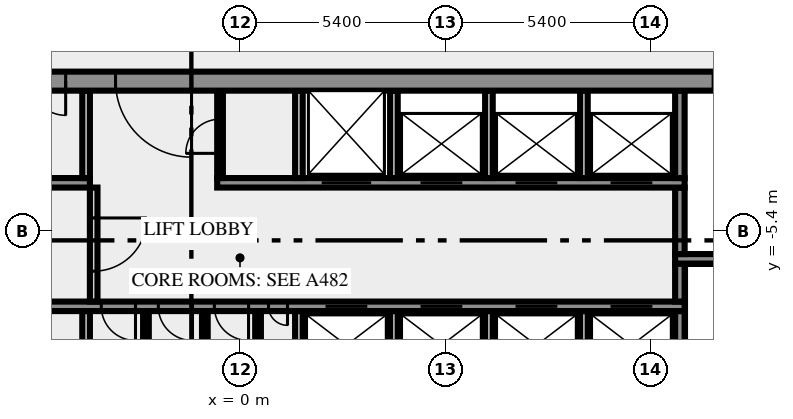
"""IFC4 building model, lengths in metres.
Left out: names, types, materials, properties, quantities, classifications, styles, units other than length and angle.
Written with IfcOpenShell. Run it as: python <this file> out.ifc"""

import sys

from ifc_helpers import new_model, si_unit, direction, frame, frame_2d, origin, place, context, subcontext, project, spatial, rectangle, extrude, element, fill, save


model = new_model("IFC4")
c1 = context("Model", 3, precision=1e-05, world=origin(), true_north=direction((0.0, 1.0)))
c2 = subcontext(c1, "Body", "Model", "MODEL_VIEW")
j1 = project(units=[si_unit("LENGTHUNIT", "METRE"), si_unit("PLANEANGLEUNIT", "RADIAN")], contexts=[c1])
p1 = place(None, origin())
s1 = spatial("IfcSite", under=j1, at=p1, CompositionType="ELEMENT")
p2 = place(p1, origin())
s2 = spatial("IfcBuilding", under=s1, at=p2, CompositionType="ELEMENT")
p3 = place(p2, frame((0.0, 0.0, 160.0)))
s3 = spatial("IfcBuildingStorey", under=s2, at=p3, CompositionType="ELEMENT", Elevation=160.0)
p4 = place(p3, frame((-4.05, -10.5, 0.0), z_axis=(0.0, 0.0, 1.0), x_axis=(0.0, 1.0, 0.0)))
e1 = element("IfcWall", 1, at=p4, inside=s3, PredefinedType="SOLIDWALL", context=c2, shape_type="SweptSolid", body=[
    extrude(rectangle(XDim=3.0, YDim=0.2, at=frame_2d((1.5, 0.0))), origin(), (0.0, 0.0, 1.0), 3.65),
])
for number, where, z_axis, x_axis in (
    (2, (-2.475, -10.5, 0.0), (0.0, 0.0, 1.0), (0.0, 1.0, 0.0)),
    (3, (-0.925, -10.5, 0.0), (0.0, 0.0, 1.0), (0.0, 1.0, 0.0)),
    (4, (0.475, -10.5, 0.0), (0.0, 0.0, 1.0), (0.0, 1.0, 0.0)),
):
    element("IfcWall", number, at=place(p3, frame(where, z_axis=z_axis, x_axis=x_axis)), inside=s3, PredefinedType="PARTITIONING", context=c2, shape_type="SweptSolid", body=[
        extrude(rectangle(XDim=3.0, YDim=0.15, at=frame_2d((1.5, 0.0))), origin(), (0.0, 0.0, 1.0), 3.65),
    ])
for number, where, z_axis, x_axis in (
    (5, (1.55, -10.5, 0.0), (0.0, 0.0, 1.0), (0.0, 1.0, 0.0)),
    (6, (4.05, -10.5, 0.0), (0.0, 0.0, 1.0), (0.0, 1.0, 0.0)),
    (7, (6.55, -10.5, 0.0), (0.0, 0.0, 1.0), (0.0, 1.0, 0.0)),
    (8, (9.05, -10.5, 0.0), (0.0, 0.0, 1.0), (0.0, 1.0, 0.0)),
):
    element("IfcWall", number, at=place(p3, frame(where, z_axis=z_axis, x_axis=x_axis)), inside=s3, PredefinedType="SOLIDWALL", context=c2, shape_type="SweptSolid", body=[
        extrude(rectangle(XDim=3.0, YDim=0.2, at=frame_2d((1.5, 0.0))), origin(), (0.0, 0.0, 1.0), 3.65),
    ])
p5 = place(p3, frame((11.575, -10.5, 0.0), z_axis=(0.0, 0.0, 1.0), x_axis=(0.0, 1.0, 0.0)))
e9 = element("IfcWall", 9, at=p5, inside=s3, PredefinedType="SHEAR", context=c2, shape_type="SweptSolid", body=[
    extrude(rectangle(XDim=3.0, YDim=0.25, at=frame_2d((1.5, 0.0))), origin(), (0.0, 0.0, 1.0), 3.65),
])
p6 = place(p3, frame((11.7, -7.375, 0.0), z_axis=(0.0, 0.0, 1.0), x_axis=(-1.0, 0.0, 0.0)))
e10 = element("IfcWall", 10, at=p6, inside=s3, PredefinedType="SHEAR", context=c2, shape_type="SweptSolid", body=[
    extrude(rectangle(XDim=23.4, YDim=0.25, at=frame_2d((11.7, 0.0))), origin(), (0.0, 0.0, 1.0), 3.65),
])
p7 = place(p6, frame((22.012, 0.0, 0.0)))
e11 = element("IfcOpeningElement", 11, at=p7, cuts=e10, PredefinedType="OPENING", context=c2, shape_type="SweptSolid", body=[
    extrude(rectangle(XDim=0.9, YDim=2.1, at=frame_2d((0.45, 1.05))), frame((0.0, 0.135, 0.0), z_axis=(0.0, -1.0, 0.0), x_axis=(1.0, 0.0, 0.0)), (0.0, 0.0, 1.0), 0.27),
])
p8 = place(p6, frame((20.05, 0.0, 0.0)))
e12 = element("IfcOpeningElement", 12, at=p8, cuts=e10, PredefinedType="OPENING", context=c2, shape_type="SweptSolid", body=[
    extrude(rectangle(XDim=0.9, YDim=2.1, at=frame_2d((0.45, 1.05))), frame((0.0, 0.135, 0.0), z_axis=(0.0, -1.0, 0.0), x_axis=(1.0, 0.0, 0.0)), (0.0, 0.0, 1.0), 0.27),
])
p9 = place(p6, frame((17.088, 0.0, 0.0)))
e13 = element("IfcOpeningElement", 13, at=p9, cuts=e10, PredefinedType="OPENING", context=c2, shape_type="SweptSolid", body=[
    extrude(rectangle(XDim=0.9, YDim=2.1, at=frame_2d((0.45, 1.05))), frame((0.0, 0.135, 0.0), z_axis=(0.0, -1.0, 0.0), x_axis=(1.0, 0.0, 0.0)), (0.0, 0.0, 1.0), 0.27),
])
p10 = place(p6, frame((14.45, 0.0, 0.0)))
e14 = element("IfcOpeningElement", 14, at=p10, cuts=e10, PredefinedType="OPENING", context=c2, shape_type="SweptSolid", body=[
    extrude(rectangle(XDim=0.9, YDim=2.1, at=frame_2d((0.45, 1.05))), frame((0.0, 0.135, 0.0), z_axis=(0.0, -1.0, 0.0), x_axis=(1.0, 0.0, 0.0)), (0.0, 0.0, 1.0), 0.27),
])
p11 = place(p6, frame((12.95, 0.0, 0.0)))
e15 = element("IfcOpeningElement", 15, at=p11, cuts=e10, PredefinedType="OPENING", context=c2, shape_type="SweptSolid", body=[
    extrude(rectangle(XDim=0.9, YDim=2.1, at=frame_2d((0.45, 1.05))), frame((0.0, 0.135, 0.0), z_axis=(0.0, -1.0, 0.0), x_axis=(1.0, 0.0, 0.0)), (0.0, 0.0, 1.0), 0.27),
])
p12 = place(p6, frame((11.475, 0.0, 0.0)))
e16 = element("IfcOpeningElement", 16, at=p12, cuts=e10, PredefinedType="OPENING", context=c2, shape_type="SweptSolid", body=[
    extrude(rectangle(XDim=0.9, YDim=2.1, at=frame_2d((0.45, 1.05))), frame((0.0, 0.135, 0.0), z_axis=(0.0, -1.0, 0.0), x_axis=(1.0, 0.0, 0.0)), (0.0, 0.0, 1.0), 0.27),
])
p13 = place(p6, frame((10.45, 0.0, 0.0)))
e17 = element("IfcOpeningElement", 17, at=p13, cuts=e10, PredefinedType="OPENING", context=c2, shape_type="SweptSolid", body=[
    extrude(rectangle(XDim=0.5, YDim=2.1, at=frame_2d((0.25, 1.05))), frame((0.0, 0.135, 0.0), z_axis=(0.0, -1.0, 0.0), x_axis=(1.0, 0.0, 0.0)), (0.0, 0.0, 1.0), 0.27),
])
p14 = place(p6, frame((8.35, 0.0, 0.0)))
e18 = element("IfcOpeningElement", 18, at=p14, cuts=e10, PredefinedType="OPENING", context=c2, shape_type="SweptSolid", body=[
    extrude(rectangle(XDim=1.1, YDim=2.1, at=frame_2d((0.55, 1.05))), frame((0.0, 0.135, 0.0), z_axis=(0.0, -1.0, 0.0), x_axis=(1.0, 0.0, 0.0)), (0.0, 0.0, 1.0), 0.27),
])
p15 = place(p6, frame((5.85, 0.0, 0.0)))
e19 = element("IfcOpeningElement", 19, at=p15, cuts=e10, PredefinedType="OPENING", context=c2, shape_type="SweptSolid", body=[
    extrude(rectangle(XDim=1.1, YDim=2.1, at=frame_2d((0.55, 1.05))), frame((0.0, 0.135, 0.0), z_axis=(0.0, -1.0, 0.0), x_axis=(1.0, 0.0, 0.0)), (0.0, 0.0, 1.0), 0.27),
])
p16 = place(p6, frame((3.35, 0.0, 0.0)))
e20 = element("IfcOpeningElement", 20, at=p16, cuts=e10, PredefinedType="OPENING", context=c2, shape_type="SweptSolid", body=[
    extrude(rectangle(XDim=1.1, YDim=2.1, at=frame_2d((0.55, 1.05))), frame((0.0, 0.135, 0.0), z_axis=(0.0, -1.0, 0.0), x_axis=(1.0, 0.0, 0.0)), (0.0, 0.0, 1.0), 0.27),
])
p17 = place(p6, frame((0.85, 0.0, 0.0)))
e21 = element("IfcOpeningElement", 21, at=p17, cuts=e10, PredefinedType="OPENING", context=c2, shape_type="SweptSolid", body=[
    extrude(rectangle(XDim=1.1, YDim=2.1, at=frame_2d((0.55, 1.05))), frame((0.0, 0.135, 0.0), z_axis=(0.0, -1.0, 0.0), x_axis=(1.0, 0.0, 0.0)), (0.0, 0.0, 1.0), 0.27),
])
p18 = place(p3, frame((-3.85, -4.25, 0.0), z_axis=(0.0, 0.0, 1.0), x_axis=(0.0, -1.0, 0.0)))
e22 = element("IfcWall", 22, at=p18, inside=s3, PredefinedType="SOLIDWALL", context=c2, shape_type="SweptSolid", body=[
    extrude(rectangle(XDim=3.0, YDim=0.2, at=frame_2d((1.5, 0.0))), origin(), (0.0, 0.0, 1.0), 3.65),
])
p19 = place(p18, frame((0.8, 0.0, 0.0)))
e23 = element("IfcOpeningElement", 23, at=p19, cuts=e22, PredefinedType="OPENING", context=c2, shape_type="SweptSolid", body=[
    extrude(rectangle(XDim=1.4, YDim=2.1, at=frame_2d((0.7, 1.05))), frame((0.0, 0.11, 0.0), z_axis=(0.0, -1.0, 0.0), x_axis=(1.0, 0.0, 0.0)), (0.0, 0.0, 1.0), 0.22),
])
p20 = place(p3, frame((11.575, -7.25, 0.0), z_axis=(0.0, 0.0, 1.0), x_axis=(0.0, 1.0, 0.0)))
e24 = element("IfcWall", 24, at=p20, inside=s3, PredefinedType="SHEAR", context=c2, shape_type="SweptSolid", body=[
    extrude(rectangle(XDim=1.0, YDim=0.25, at=frame_2d((0.5, 0.0))), origin(), (0.0, 0.0, 1.0), 3.65),
])
p21 = place(p3, frame((19.5, -6.125, 0.0), z_axis=(0.0, 0.0, 1.0), x_axis=(-1.0, 0.0, 0.0)))
e25 = element("IfcWall", 25, at=p21, inside=s3, PredefinedType="SHEAR", context=c2, shape_type="SweptSolid", body=[
    extrude(rectangle(XDim=8.05, YDim=0.25, at=frame_2d((4.025, 0.0))), origin(), (0.0, 0.0, 1.0), 3.65),
])
p22 = place(p21, frame((0.05, 0.0, 0.0)))
e26 = element("IfcOpeningElement", 26, at=p22, cuts=e25, PredefinedType="OPENING", context=c2, shape_type="SweptSolid", body=[
    extrude(rectangle(XDim=1.8, YDim=2.1, at=frame_2d((0.9, 1.05))), frame((0.0, 0.135, 0.0), z_axis=(0.0, -1.0, 0.0), x_axis=(1.0, 0.0, 0.0)), (0.0, 0.0, 1.0), 0.27),
])
p23 = place(p3, frame((11.575, -6.0, 0.0), z_axis=(0.0, 0.0, 1.0), x_axis=(0.0, 1.0, 0.0)))
e27 = element("IfcWall", 27, at=p23, inside=s3, PredefinedType="SHEAR", context=c2, shape_type="SweptSolid", body=[
    extrude(rectangle(XDim=1.75, YDim=0.25, at=frame_2d((0.875, 0.0))), origin(), (0.0, 0.0, 1.0), 3.65),
])
p24 = place(p3, frame((-11.7, -4.125, 0.0), z_axis=(0.0, 0.0, 1.0), x_axis=(1.0, 0.0, 0.0)))
e28 = element("IfcWall", 28, at=p24, inside=s3, PredefinedType="SHEAR", context=c2, shape_type="SweptSolid", body=[
    extrude(rectangle(XDim=7.75, YDim=0.25, at=frame_2d((3.875, 0.0))), origin(), (0.0, 0.0, 1.0), 3.65),
])
p25 = place(p3, frame((-0.6, -4.125, 0.0), z_axis=(0.0, 0.0, 1.0), x_axis=(1.0, 0.0, 0.0)))
e29 = element("IfcWall", 29, at=p25, inside=s3, PredefinedType="SHEAR", context=c2, shape_type="SweptSolid", body=[
    extrude(rectangle(XDim=12.3, YDim=0.25, at=frame_2d((6.15, 0.0))), origin(), (0.0, 0.0, 1.0), 3.65),
])
p26 = place(p25, frame((2.75, 0.0, 0.0)))
e30 = element("IfcOpeningElement", 30, at=p26, cuts=e29, PredefinedType="OPENING", context=c2, shape_type="SweptSolid", body=[
    extrude(rectangle(XDim=1.3, YDim=2.1, at=frame_2d((0.65, 1.05))), frame((0.0, 0.135, 0.0), z_axis=(0.0, -1.0, 0.0), x_axis=(1.0, 0.0, 0.0)), (0.0, 0.0, 1.0), 0.27),
])
p27 = place(p25, frame((5.35, 0.0, 0.0)))
e31 = element("IfcOpeningElement", 31, at=p27, cuts=e29, PredefinedType="OPENING", context=c2, shape_type="SweptSolid", body=[
    extrude(rectangle(XDim=1.1, YDim=2.1, at=frame_2d((0.55, 1.05))), frame((0.0, 0.135, 0.0), z_axis=(0.0, -1.0, 0.0), x_axis=(1.0, 0.0, 0.0)), (0.0, 0.0, 1.0), 0.27),
])
p28 = place(p25, frame((7.85, 0.0, 0.0)))
e32 = element("IfcOpeningElement", 32, at=p28, cuts=e29, PredefinedType="OPENING", context=c2, shape_type="SweptSolid", body=[
    extrude(rectangle(XDim=1.1, YDim=2.1, at=frame_2d((0.55, 1.05))), frame((0.0, 0.135, 0.0), z_axis=(0.0, -1.0, 0.0), x_axis=(1.0, 0.0, 0.0)), (0.0, 0.0, 1.0), 0.27),
])
p29 = place(p25, frame((10.35, 0.0, 0.0)))
e33 = element("IfcOpeningElement", 33, at=p29, cuts=e29, PredefinedType="OPENING", context=c2, shape_type="SweptSolid", body=[
    extrude(rectangle(XDim=1.1, YDim=2.1, at=frame_2d((0.55, 1.05))), frame((0.0, 0.135, 0.0), z_axis=(0.0, -1.0, 0.0), x_axis=(1.0, 0.0, 0.0)), (0.0, 0.0, 1.0), 0.27),
])
p30 = place(p3, frame((-4.05, -4.0, 0.0), z_axis=(0.0, 0.0, 1.0), x_axis=(0.0, 1.0, 0.0)))
e34 = element("IfcWall", 34, at=p30, inside=s3, PredefinedType="SOLIDWALL", context=c2, shape_type="SweptSolid", body=[
    extrude(rectangle(XDim=2.3, YDim=0.2, at=frame_2d((1.15, 0.0))), origin(), (0.0, 0.0, 1.0), 3.65),
])
p31 = place(p3, frame((-0.525, -4.0, 0.0), z_axis=(0.0, 0.0, 1.0), x_axis=(0.0, 1.0, 0.0)))
e35 = element("IfcWall", 35, at=p31, inside=s3, PredefinedType="PARTITIONING", context=c2, shape_type="SweptSolid", body=[
    extrude(rectangle(XDim=2.3, YDim=0.15, at=frame_2d((1.15, 0.0))), origin(), (0.0, 0.0, 1.0), 3.65),
])
p32 = place(p31, frame((0.65, 0.0, 0.0)))
e36 = element("IfcOpeningElement", 36, at=p32, cuts=e35, PredefinedType="OPENING", context=c2, shape_type="SweptSolid", body=[
    extrude(rectangle(XDim=0.9, YDim=2.1, at=frame_2d((0.45, 1.05))), frame((0.0, 0.085, 0.0), z_axis=(0.0, -1.0, 0.0), x_axis=(1.0, 0.0, 0.0)), (0.0, 0.0, 1.0), 0.17),
])
for number, where, z_axis, x_axis in (
    (37, (1.55, -4.0, 0.0), (0.0, 0.0, 1.0), (0.0, 1.0, 0.0)),
    (38, (4.05, -4.0, 0.0), (0.0, 0.0, 1.0), (0.0, 1.0, 0.0)),
    (39, (6.55, -4.0, 0.0), (0.0, 0.0, 1.0), (0.0, 1.0, 0.0)),
    (40, (9.05, -4.0, 0.0), (0.0, 0.0, 1.0), (0.0, 1.0, 0.0)),
):
    element("IfcWall", number, at=place(p3, frame(where, z_axis=z_axis, x_axis=x_axis)), inside=s3, PredefinedType="SOLIDWALL", context=c2, shape_type="SweptSolid", body=[
        extrude(rectangle(XDim=2.3, YDim=0.2, at=frame_2d((1.15, 0.0))), origin(), (0.0, 0.0, 1.0), 3.65),
    ])
p33 = place(p3, frame((11.575, -4.0, 0.0), z_axis=(0.0, 0.0, 1.0), x_axis=(0.0, 1.0, 0.0)))
e41 = element("IfcWall", 41, at=p33, inside=s3, PredefinedType="SHEAR", context=c2, shape_type="SweptSolid", body=[
    extrude(rectangle(XDim=2.3, YDim=0.25, at=frame_2d((1.15, 0.0))), origin(), (0.0, 0.0, 1.0), 3.65),
])
p34 = place(p3, frame((20.49, -1.45, 0.0), z_axis=(0.0, 0.0, 1.0), x_axis=(-1.0, 0.0, 0.0)))
e42 = element("IfcWall", 42, at=p34, inside=s3, PredefinedType="SHEAR", context=c2, shape_type="SweptSolid", body=[
    extrude(rectangle(XDim=40.98, YDim=0.5, at=frame_2d((20.49, 0.0))), origin(), (0.0, 0.0, 1.0), 3.65),
])
p35 = place(p34, frame((38.14, 0.0, 0.0)))
e43 = element("IfcOpeningElement", 43, at=p35, cuts=e42, PredefinedType="OPENING", context=c2, shape_type="SweptSolid", body=[
    extrude(rectangle(XDim=1.8, YDim=2.1, at=frame_2d((0.9, 1.05))), frame((0.0, 0.26, 0.0), z_axis=(0.0, -1.0, 0.0), x_axis=(1.0, 0.0, 0.0)), (0.0, 0.0, 1.0), 0.52),
])
p36 = place(p34, frame((35.89, 0.0, 0.0)))
e44 = element("IfcOpeningElement", 44, at=p36, cuts=e42, PredefinedType="OPENING", context=c2, shape_type="SweptSolid", body=[
    extrude(rectangle(XDim=0.9, YDim=2.1, at=frame_2d((0.45, 1.05))), frame((0.0, 0.26, 0.0), z_axis=(0.0, -1.0, 0.0), x_axis=(1.0, 0.0, 0.0)), (0.0, 0.0, 1.0), 0.52),
])
p37 = place(p34, frame((32.94, 0.0, 0.0)))
e45 = element("IfcOpeningElement", 45, at=p37, cuts=e42, PredefinedType="OPENING", context=c2, shape_type="SweptSolid", body=[
    extrude(rectangle(XDim=0.9, YDim=2.1, at=frame_2d((0.45, 1.05))), frame((0.0, 0.26, 0.0), z_axis=(0.0, -1.0, 0.0), x_axis=(1.0, 0.0, 0.0)), (0.0, 0.0, 1.0), 0.52),
])
p38 = place(p34, frame((28.802, 0.0, 0.0)))
e46 = element("IfcOpeningElement", 46, at=p38, cuts=e42, PredefinedType="OPENING", context=c2, shape_type="SweptSolid", body=[
    extrude(rectangle(XDim=0.9, YDim=2.1, at=frame_2d((0.45, 1.05))), frame((0.0, 0.26, 0.0), z_axis=(0.0, -1.0, 0.0), x_axis=(1.0, 0.0, 0.0)), (0.0, 0.0, 1.0), 0.52),
])
p39 = place(p34, frame((25.077, 0.0, 0.0)))
e47 = element("IfcOpeningElement", 47, at=p39, cuts=e42, PredefinedType="OPENING", context=c2, shape_type="SweptSolid", body=[
    extrude(rectangle(XDim=0.9, YDim=2.1, at=frame_2d((0.45, 1.05))), frame((0.0, 0.26, 0.0), z_axis=(0.0, -1.0, 0.0), x_axis=(1.0, 0.0, 0.0)), (0.0, 0.0, 1.0), 0.52),
])
p40 = place(p34, frame((21.765, 0.0, 0.0)))
e48 = element("IfcOpeningElement", 48, at=p40, cuts=e42, PredefinedType="OPENING", context=c2, shape_type="SweptSolid", body=[
    extrude(rectangle(XDim=2.0, YDim=2.1, at=frame_2d((1.0, 1.05))), frame((0.0, 0.26, 0.0), z_axis=(0.0, -1.0, 0.0), x_axis=(1.0, 0.0, 0.0)), (0.0, 0.0, 1.0), 0.52),
])
p41 = place(p34, frame((7.14, 0.0, 0.0)))
e49 = element("IfcOpeningElement", 49, at=p41, cuts=e42, PredefinedType="OPENING", context=c2, shape_type="SweptSolid", body=[
    extrude(rectangle(XDim=0.9, YDim=2.1, at=frame_2d((0.45, 1.05))), frame((0.0, 0.26, 0.0), z_axis=(0.0, -1.0, 0.0), x_axis=(1.0, 0.0, 0.0)), (0.0, 0.0, 1.0), 0.52),
])
p42 = place(p34, frame((5.028, 0.0, 0.0)))
e50 = element("IfcOpeningElement", 50, at=p42, cuts=e42, PredefinedType="OPENING", context=c2, shape_type="SweptSolid", body=[
    extrude(rectangle(XDim=0.8, YDim=2.1, at=frame_2d((0.4, 1.05))), frame((0.0, 0.26, 0.0), z_axis=(0.0, -1.0, 0.0), x_axis=(1.0, 0.0, 0.0)), (0.0, 0.0, 1.0), 0.52),
])
p43 = place(p34, frame((3.452, 0.0, 0.0)))
e51 = element("IfcOpeningElement", 51, at=p43, cuts=e42, PredefinedType="OPENING", context=c2, shape_type="SweptSolid", body=[
    extrude(rectangle(XDim=0.8, YDim=2.1, at=frame_2d((0.4, 1.05))), frame((0.0, 0.26, 0.0), z_axis=(0.0, -1.0, 0.0), x_axis=(1.0, 0.0, 0.0)), (0.0, 0.0, 1.0), 0.52),
])
p44 = place(p34, frame((1.04, 0.0, 0.0)))
e52 = element("IfcOpeningElement", 52, at=p44, cuts=e42, PredefinedType="OPENING", context=c2, shape_type="SweptSolid", body=[
    extrude(rectangle(XDim=1.8, YDim=2.1, at=frame_2d((0.9, 1.05))), frame((0.0, 0.26, 0.0), z_axis=(0.0, -1.0, 0.0), x_axis=(1.0, 0.0, 0.0)), (0.0, 0.0, 1.0), 0.52),
])
p45 = place(p10, origin())
e53 = element("IfcDoor", 53, at=p45, inside=s3, OperationType="SINGLE_SWING_RIGHT", PredefinedType="DOOR", context=c2, shape_type="SweptSolid", body=[
    extrude(rectangle(XDim=0.9, YDim=2.1, at=frame_2d((0.45, 1.05))), frame((0.0, 0.025, 0.0), z_axis=(0.0, -1.0, 0.0), x_axis=(1.0, 0.0, 0.0)), (0.0, 0.0, 1.0), 0.05),
])
fill(e14, e53)
p46 = place(p11, origin())
e54 = element("IfcDoor", 54, at=p46, inside=s3, OperationType="SINGLE_SWING_RIGHT", PredefinedType="DOOR", context=c2, shape_type="SweptSolid", body=[
    extrude(rectangle(XDim=0.9, YDim=2.1, at=frame_2d((0.45, 1.05))), frame((0.0, 0.025, 0.0), z_axis=(0.0, -1.0, 0.0), x_axis=(1.0, 0.0, 0.0)), (0.0, 0.0, 1.0), 0.05),
])
fill(e15, e54)
p47 = place(p12, origin())
e55 = element("IfcDoor", 55, at=p47, inside=s3, OperationType="SINGLE_SWING_RIGHT", PredefinedType="DOOR", context=c2, shape_type="SweptSolid", body=[
    extrude(rectangle(XDim=0.9, YDim=2.1, at=frame_2d((0.45, 1.05))), frame((0.0, 0.025, 0.0), z_axis=(0.0, -1.0, 0.0), x_axis=(1.0, 0.0, 0.0)), (0.0, 0.0, 1.0), 0.05),
])
fill(e16, e55)
p48 = place(p13, origin())
e56 = element("IfcDoor", 56, at=p48, inside=s3, OperationType="SINGLE_SWING_LEFT", PredefinedType="DOOR", context=c2, shape_type="SweptSolid", body=[
    extrude(rectangle(XDim=0.5, YDim=2.1, at=frame_2d((0.25, 1.05))), frame((0.0, 0.025, 0.0), z_axis=(0.0, -1.0, 0.0), x_axis=(1.0, 0.0, 0.0)), (0.0, 0.0, 1.0), 0.05),
])
fill(e17, e56)
p49 = place(p14, origin())
e57 = element("IfcDoor", 57, at=p49, inside=s3, OperationType="DOUBLE_DOOR_SLIDING", PredefinedType="DOOR", context=c2, shape_type="SweptSolid", body=[
    extrude(rectangle(XDim=1.1, YDim=2.1, at=frame_2d((0.55, 1.05))), frame((0.0, 0.025, 0.0), z_axis=(0.0, -1.0, 0.0), x_axis=(1.0, 0.0, 0.0)), (0.0, 0.0, 1.0), 0.05),
])
fill(e18, e57)
p50 = place(p15, origin())
e58 = element("IfcDoor", 58, at=p50, inside=s3, OperationType="DOUBLE_DOOR_SLIDING", PredefinedType="DOOR", context=c2, shape_type="SweptSolid", body=[
    extrude(rectangle(XDim=1.1, YDim=2.1, at=frame_2d((0.55, 1.05))), frame((0.0, 0.025, 0.0), z_axis=(0.0, -1.0, 0.0), x_axis=(1.0, 0.0, 0.0)), (0.0, 0.0, 1.0), 0.05),
])
fill(e19, e58)
p51 = place(p16, origin())
e59 = element("IfcDoor", 59, at=p51, inside=s3, OperationType="DOUBLE_DOOR_SLIDING", PredefinedType="DOOR", context=c2, shape_type="SweptSolid", body=[
    extrude(rectangle(XDim=1.1, YDim=2.1, at=frame_2d((0.55, 1.05))), frame((0.0, 0.025, 0.0), z_axis=(0.0, -1.0, 0.0), x_axis=(1.0, 0.0, 0.0)), (0.0, 0.0, 1.0), 0.05),
])
fill(e20, e59)
p52 = place(p17, origin())
e60 = element("IfcDoor", 60, at=p52, inside=s3, OperationType="DOUBLE_DOOR_SLIDING", PredefinedType="DOOR", context=c2, shape_type="SweptSolid", body=[
    extrude(rectangle(XDim=1.1, YDim=2.1, at=frame_2d((0.55, 1.05))), frame((0.0, 0.025, 0.0), z_axis=(0.0, -1.0, 0.0), x_axis=(1.0, 0.0, 0.0)), (0.0, 0.0, 1.0), 0.05),
])
fill(e21, e60)
p53 = place(p19, origin())
e61 = element("IfcDoor", 61, at=p53, inside=s3, OperationType="DOUBLE_DOOR_SINGLE_SWING", PredefinedType="DOOR", context=c2, shape_type="SweptSolid", body=[
    extrude(rectangle(XDim=1.4, YDim=2.1, at=frame_2d((0.7, 1.05))), frame((0.0, 0.025, 0.0), z_axis=(0.0, -1.0, 0.0), x_axis=(1.0, 0.0, 0.0)), (0.0, 0.0, 1.0), 0.05),
])
fill(e23, e61)
p54 = place(p26, origin())
e62 = element("IfcDoor", 62, at=p54, inside=s3, OperationType="DOUBLE_DOOR_SLIDING", PredefinedType="DOOR", context=c2, shape_type="SweptSolid", body=[
    extrude(rectangle(XDim=1.3, YDim=2.1, at=frame_2d((0.65, 1.05))), frame((0.0, 0.025, 0.0), z_axis=(0.0, -1.0, 0.0), x_axis=(1.0, 0.0, 0.0)), (0.0, 0.0, 1.0), 0.05),
])
fill(e30, e62)
p55 = place(p27, origin())
e63 = element("IfcDoor", 63, at=p55, inside=s3, OperationType="DOUBLE_DOOR_SLIDING", PredefinedType="DOOR", context=c2, shape_type="SweptSolid", body=[
    extrude(rectangle(XDim=1.1, YDim=2.1, at=frame_2d((0.55, 1.05))), frame((0.0, 0.025, 0.0), z_axis=(0.0, -1.0, 0.0), x_axis=(1.0, 0.0, 0.0)), (0.0, 0.0, 1.0), 0.05),
])
fill(e31, e63)
p56 = place(p28, origin())
e64 = element("IfcDoor", 64, at=p56, inside=s3, OperationType="DOUBLE_DOOR_SLIDING", PredefinedType="DOOR", context=c2, shape_type="SweptSolid", body=[
    extrude(rectangle(XDim=1.1, YDim=2.1, at=frame_2d((0.55, 1.05))), frame((0.0, 0.025, 0.0), z_axis=(0.0, -1.0, 0.0), x_axis=(1.0, 0.0, 0.0)), (0.0, 0.0, 1.0), 0.05),
])
fill(e32, e64)
p57 = place(p29, origin())
e65 = element("IfcDoor", 65, at=p57, inside=s3, OperationType="DOUBLE_DOOR_SLIDING", PredefinedType="DOOR", context=c2, shape_type="SweptSolid", body=[
    extrude(rectangle(XDim=1.1, YDim=2.1, at=frame_2d((0.55, 1.05))), frame((0.0, 0.025, 0.0), z_axis=(0.0, -1.0, 0.0), x_axis=(1.0, 0.0, 0.0)), (0.0, 0.0, 1.0), 0.05),
])
fill(e33, e65)
p58 = place(p32, origin())
e66 = element("IfcDoor", 66, at=p58, inside=s3, OperationType="SINGLE_SWING_LEFT", PredefinedType="DOOR", context=c2, shape_type="SweptSolid", body=[
    extrude(rectangle(XDim=0.9, YDim=2.1, at=frame_2d((0.45, 1.05))), frame((0.0, 0.025, 0.0), z_axis=(0.0, -1.0, 0.0), x_axis=(1.0, 0.0, 0.0)), (0.0, 0.0, 1.0), 0.05),
])
fill(e36, e66)
p59 = place(p39, origin())
e67 = element("IfcDoor", 67, at=p59, inside=s3, OperationType="SINGLE_SWING_RIGHT", PredefinedType="DOOR", context=c2, shape_type="SweptSolid", body=[
    extrude(rectangle(XDim=0.9, YDim=2.1, at=frame_2d((0.45, 1.05))), frame((0.0, 0.025, 0.0), z_axis=(0.0, -1.0, 0.0), x_axis=(1.0, 0.0, 0.0)), (0.0, 0.0, 1.0), 0.05),
])
fill(e47, e67)
p60 = place(p40, origin())
e68 = element("IfcDoor", 68, at=p60, inside=s3, OperationType="DOUBLE_DOOR_SINGLE_SWING", PredefinedType="DOOR", context=c2, shape_type="SweptSolid", body=[
    extrude(rectangle(XDim=2.0, YDim=2.1, at=frame_2d((1.0, 1.05))), frame((0.0, 0.025, 0.0), z_axis=(0.0, -1.0, 0.0), x_axis=(1.0, 0.0, 0.0)), (0.0, 0.0, 1.0), 0.05),
])
fill(e48, e68)
save(model, sys.argv[1])
